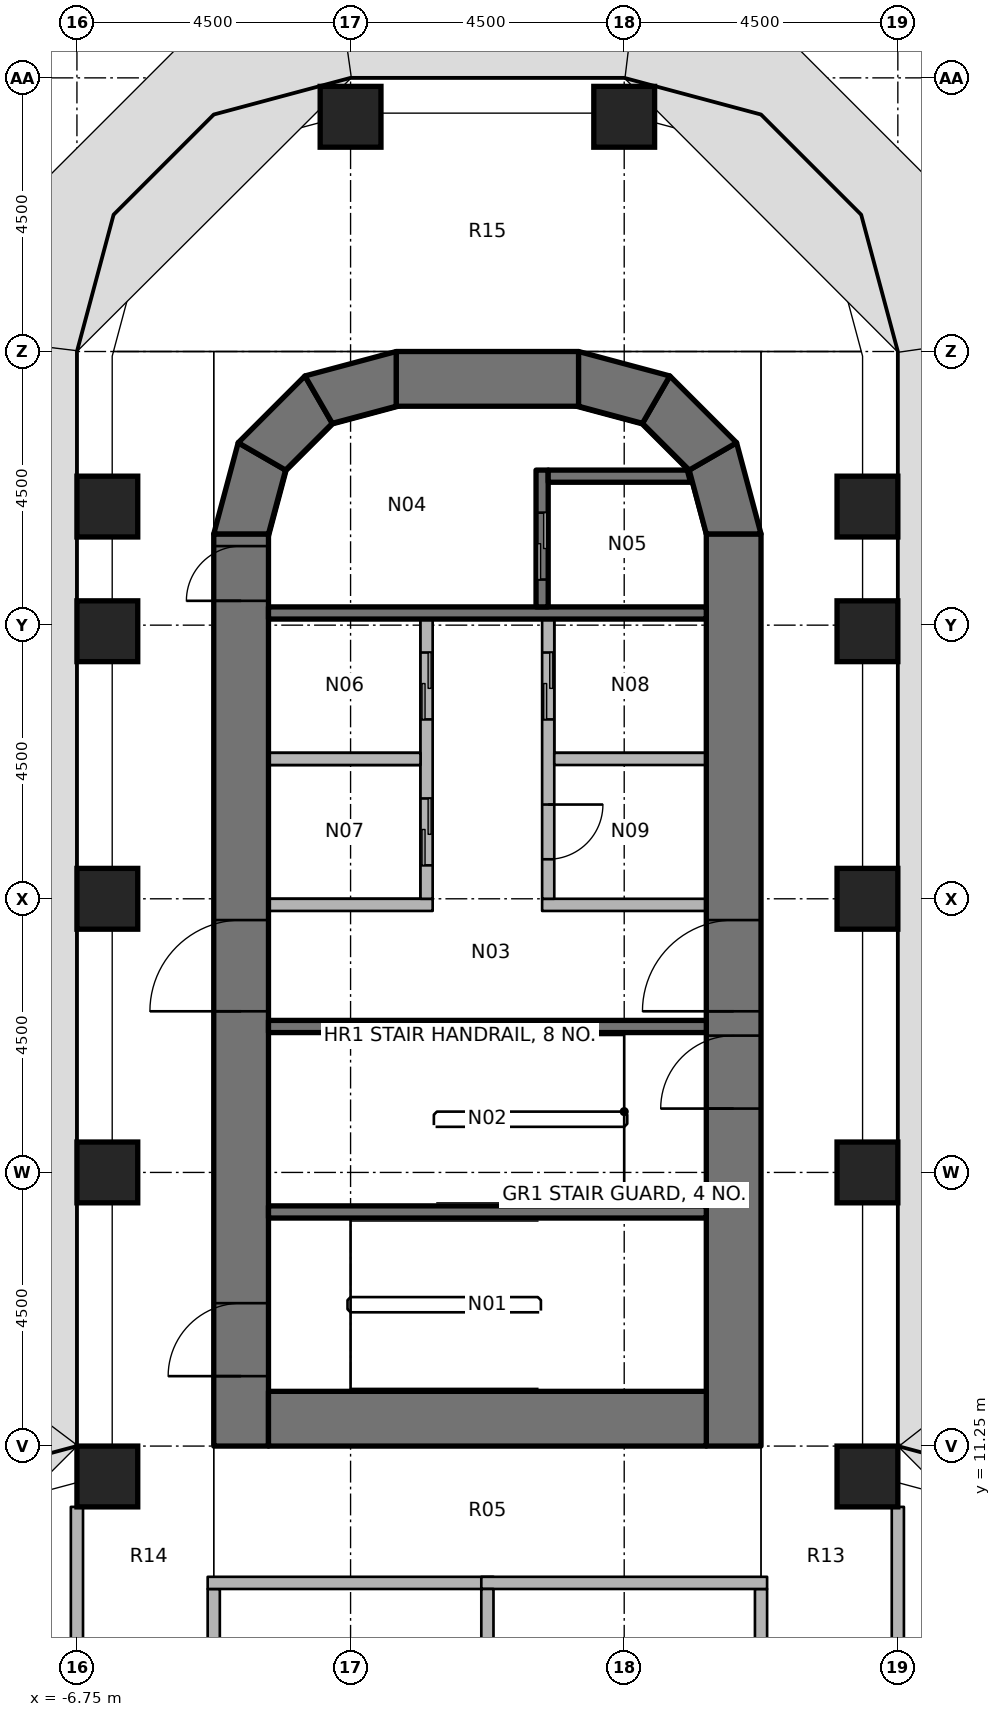
"""IFC4 building model, lengths in metres.
Left out: names, types, materials, properties, quantities, classifications, styles, units other than length and angle.
Written with IfcOpenShell. Run it as: python <this file> out.ifc"""

import sys

from ifc_helpers import new_model, si_unit, direction, frame, frame_2d, origin, origin_2d, place, context, subcontext, project, spatial, polyline, rectangle, outline, extrude, element, fill, save


model = new_model("IFC4")
c1 = context("Model", 3, precision=1e-05, world=origin(), true_north=direction((0.0, 1.0)))
c2 = subcontext(c1, "Body", "Model", "MODEL_VIEW")
j1 = project(units=[si_unit("LENGTHUNIT", "METRE"), si_unit("PLANEANGLEUNIT", "RADIAN")], contexts=[c1])
p1 = place(None, origin())
s1 = spatial("IfcSite", under=j1, at=p1, CompositionType="ELEMENT")
p2 = place(p1, origin())
s2 = spatial("IfcBuilding", under=s1, at=p2, CompositionType="ELEMENT")
p3 = place(p2, frame((0.0, 0.0, 56.4)))
s3 = spatial("IfcBuildingStorey", under=s2, at=p3, CompositionType="ELEMENT", Elevation=56.4)
for number, where, z_axis, x_axis in (
    (1, (-6.25, 10.75, 0.0), (0.0, 0.0, 1.0), (1.0, 0.0, 0.0)),
    (2, (-6.25, 15.75, 0.0), (0.0, 0.0, 1.0), (1.0, 0.0, 0.0)),
    (3, (-6.25, 20.25, 0.0), (0.0, 0.0, 1.0), (1.0, 0.0, 0.0)),
    (4, (-6.25, 24.65, 0.0), (0.0, 0.0, 1.0), (1.0, 0.0, 0.0)),
    (5, (-6.25, 26.7, 0.0), (0.0, 0.0, 1.0), (1.0, 0.0, 0.0)),
    (6, (-2.25, 33.11, 0.0), (0.0, 0.0, 1.0), (1.0, 0.0, 0.0)),
    (7, (2.25, 33.11, 0.0), (0.0, 0.0, 1.0), (1.0, 0.0, 0.0)),
    (8, (6.25, 10.75, 0.0), (0.0, 0.0, 1.0), (1.0, 0.0, 0.0)),
    (9, (6.25, 15.75, 0.0), (0.0, 0.0, 1.0), (1.0, 0.0, 0.0)),
    (10, (6.25, 20.25, 0.0), (0.0, 0.0, 1.0), (1.0, 0.0, 0.0)),
    (11, (6.25, 24.65, 0.0), (0.0, 0.0, 1.0), (1.0, 0.0, 0.0)),
    (12, (6.25, 26.7, 0.0), (0.0, 0.0, 1.0), (1.0, 0.0, 0.0)),
):
    element("IfcColumn", number, at=place(p3, frame(where, z_axis=z_axis, x_axis=x_axis)), inside=s3, PredefinedType="COLUMN", context=c2, shape_type="SweptSolid", body=[
        extrude(rectangle(XDim=1.0, YDim=1.0, at=origin_2d()), origin(), (0.0, 0.0, 1.0), 4.05),
    ])
p4 = place(p3, frame((-4.05, 11.25, 0.0), z_axis=(0.0, 0.0, 1.0), x_axis=(0.0, 1.0, 0.0)))
e13 = element("IfcWall", 13, at=p4, inside=s3, PredefinedType="SHEAR", context=c2, shape_type="SweptSolid", body=[
    extrude(rectangle(XDim=15.0, YDim=0.9, at=frame_2d((7.5, 0.0))), origin(), (0.0, 0.0, 1.0), 4.2),
])
p5 = place(p4, frame((7.15, 0.0, 0.0)))
e14 = element("IfcOpeningElement", 14, at=p5, cuts=e13, PredefinedType="OPENING", context=c2, shape_type="SweptSolid", body=[
    extrude(rectangle(XDim=1.5, YDim=2.3, at=frame_2d((0.75, 1.15))), frame((0.0, 0.46, 0.0), z_axis=(0.0, -1.0, 0.0), x_axis=(1.0, 0.0, 0.0)), (0.0, 0.0, 1.0), 0.92),
])
p6 = place(p4, frame((13.9, 0.0, 0.0)))
e15 = element("IfcOpeningElement", 15, at=p6, cuts=e13, PredefinedType="OPENING", context=c2, shape_type="SweptSolid", body=[
    extrude(rectangle(XDim=0.9, YDim=2.1, at=frame_2d((0.45, 1.05))), frame((0.0, 0.46, 0.0), z_axis=(0.0, -1.0, 0.0), x_axis=(1.0, 0.0, 0.0)), (0.0, 0.0, 1.0), 0.92),
])
p7 = place(p4, frame((1.15, 0.0, 0.0)))
e16 = element("IfcOpeningElement", 16, at=p7, cuts=e13, PredefinedType="OPENING", context=c2, shape_type="SweptSolid", body=[
    extrude(rectangle(XDim=1.2, YDim=2.1, at=frame_2d((0.6, 1.05))), frame((0.0, 0.46, 0.0), z_axis=(0.0, -1.0, 0.0), x_axis=(1.0, 0.0, 0.0)), (0.0, 0.0, 1.0), 0.92),
])
p8 = place(p3, frame((4.05, 11.25, 0.0), z_axis=(0.0, 0.0, 1.0), x_axis=(0.0, 1.0, 0.0)))
e17 = element("IfcWall", 17, at=p8, inside=s3, PredefinedType="SHEAR", context=c2, shape_type="SweptSolid", body=[
    extrude(rectangle(XDim=15.0, YDim=0.9, at=frame_2d((7.5, 0.0))), origin(), (0.0, 0.0, 1.0), 4.2),
])
p9 = place(p8, frame((7.15, 0.0, 0.0)))
e18 = element("IfcOpeningElement", 18, at=p9, cuts=e17, PredefinedType="OPENING", context=c2, shape_type="SweptSolid", body=[
    extrude(rectangle(XDim=1.5, YDim=2.3, at=frame_2d((0.75, 1.15))), frame((0.0, 0.46, 0.0), z_axis=(0.0, -1.0, 0.0), x_axis=(1.0, 0.0, 0.0)), (0.0, 0.0, 1.0), 0.92),
])
p10 = place(p8, frame((5.55, 0.0, 0.0)))
e19 = element("IfcOpeningElement", 19, at=p10, cuts=e17, PredefinedType="OPENING", context=c2, shape_type="SweptSolid", body=[
    extrude(rectangle(XDim=1.2, YDim=2.1, at=frame_2d((0.6, 1.05))), frame((0.0, 0.46, 0.0), z_axis=(0.0, -1.0, 0.0), x_axis=(1.0, 0.0, 0.0)), (0.0, 0.0, 1.0), 0.92),
])
p11 = place(p3, frame((-3.6, 11.7, 0.0), z_axis=(0.0, 0.0, 1.0), x_axis=(1.0, 0.0, 0.0)))
e20 = element("IfcWall", 20, at=p11, inside=s3, PredefinedType="SHEAR", context=c2, shape_type="SweptSolid", body=[
    extrude(rectangle(XDim=7.2, YDim=0.9, at=frame_2d((3.6, 0.0))), origin(), (0.0, 0.0, 1.0), 4.2),
])
p12 = place(p3, frame((-1.5, 28.8, 0.0), z_axis=(0.0, 0.0, 1.0), x_axis=(1.0, 0.0, 0.0)))
e21 = element("IfcWall", 21, at=p12, inside=s3, PredefinedType="SHEAR", context=c2, shape_type="SweptSolid", body=[
    extrude(rectangle(XDim=3.0, YDim=0.9, at=frame_2d((1.5, 0.0))), origin(), (0.0, 0.0, 1.0), 4.2),
])
p13 = place(p3, origin())
e22 = element("IfcWall", 22, at=p13, inside=s3, PredefinedType="SHEAR", context=c2, shape_type="SweptSolid", body=[
    extrude(outline(polyline([(-4.5, 26.25), (-4.098, 27.75), (-3.319, 27.3), (-3.6, 26.25), (-4.5, 26.25)])), origin(), (0.0, 0.0, 1.0), 4.2),
])
p14 = place(p3, origin())
e23 = element("IfcWall", 23, at=p14, inside=s3, PredefinedType="SHEAR", context=c2, shape_type="SweptSolid", body=[
    extrude(outline(polyline([(-4.098, 27.75), (-3.0, 28.848), (-2.55, 28.069), (-3.319, 27.3), (-4.098, 27.75)])), origin(), (0.0, 0.0, 1.0), 4.2),
])
p15 = place(p3, origin())
e24 = element("IfcWall", 24, at=p15, inside=s3, PredefinedType="SHEAR", context=c2, shape_type="SweptSolid", body=[
    extrude(outline(polyline([(-3.0, 28.848), (-1.5, 29.25), (-1.5, 28.35), (-2.55, 28.069), (-3.0, 28.848)])), origin(), (0.0, 0.0, 1.0), 4.2),
])
p16 = place(p3, origin())
e25 = element("IfcWall", 25, at=p16, inside=s3, PredefinedType="SHEAR", context=c2, shape_type="SweptSolid", body=[
    extrude(outline(polyline([(4.5, 26.25), (4.098, 27.75), (3.319, 27.3), (3.6, 26.25), (4.5, 26.25)])), origin(), (0.0, 0.0, 1.0), 4.2),
])
p17 = place(p3, origin())
e26 = element("IfcWall", 26, at=p17, inside=s3, PredefinedType="SHEAR", context=c2, shape_type="SweptSolid", body=[
    extrude(outline(polyline([(4.098, 27.75), (3.0, 28.848), (2.55, 28.069), (3.319, 27.3), (4.098, 27.75)])), origin(), (0.0, 0.0, 1.0), 4.2),
])
p18 = place(p3, origin())
e27 = element("IfcWall", 27, at=p18, inside=s3, PredefinedType="SHEAR", context=c2, shape_type="SweptSolid", body=[
    extrude(outline(polyline([(3.0, 28.848), (1.5, 29.25), (1.5, 28.35), (2.55, 28.069), (3.0, 28.848)])), origin(), (0.0, 0.0, 1.0), 4.2),
])
p19 = place(p3, frame((-3.6, 24.95, 0.0), z_axis=(0.0, 0.0, 1.0), x_axis=(1.0, 0.0, 0.0)))
e28 = element("IfcWall", 28, at=p19, inside=s3, PredefinedType="SHEAR", context=c2, shape_type="SweptSolid", body=[
    extrude(rectangle(XDim=7.2, YDim=0.2, at=frame_2d((3.6, 0.0))), origin(), (0.0, 0.0, 1.0), 4.05),
])
p20 = place(p3, frame((0.9, 27.3, 0.0), z_axis=(0.0, 0.0, 1.0), x_axis=(0.0, -1.0, 0.0)))
e29 = element("IfcWall", 29, at=p20, inside=s3, PredefinedType="SHEAR", context=c2, shape_type="SweptSolid", body=[
    extrude(rectangle(XDim=2.25, YDim=0.2, at=frame_2d((1.125, 0.0))), origin(), (0.0, 0.0, 1.0), 4.05),
])
p21 = place(p20, frame((0.7, 0.0, 0.0)))
e30 = element("IfcOpeningElement", 30, at=p21, cuts=e29, PredefinedType="OPENING", context=c2, shape_type="SweptSolid", body=[
    extrude(rectangle(XDim=1.1, YDim=2.3, at=frame_2d((0.55, 1.15))), frame((0.0, 0.11, 0.0), z_axis=(0.0, -1.0, 0.0), x_axis=(1.0, 0.0, 0.0)), (0.0, 0.0, 1.0), 0.22),
])
p22 = place(p3, origin())
e31 = element("IfcWall", 31, at=p22, inside=s3, PredefinedType="SHEAR", context=c2, shape_type="SweptSolid", body=[
    extrude(outline(polyline([(1.0, 27.1), (3.341, 27.1), (3.291, 27.284), (3.275, 27.3), (1.0, 27.3), (1.0, 27.1)])), origin(), (0.0, 0.0, 1.0), 4.05),
])
for number, where, z_axis, x_axis in (
    (32, (-3.6, 18.15, 0.0), (0.0, 0.0, 1.0), (1.0, 0.0, 0.0)),
    (33, (-3.6, 15.1, 0.0), (0.0, 0.0, 1.0), (1.0, 0.0, 0.0)),
):
    element("IfcWall", number, at=place(p3, frame(where, z_axis=z_axis, x_axis=x_axis)), inside=s3, PredefinedType="SHEAR", context=c2, shape_type="SweptSolid", body=[
        extrude(rectangle(XDim=7.2, YDim=0.2, at=frame_2d((3.6, 0.0))), origin(), (0.0, 0.0, 1.0), 4.05),
    ])
p23 = place(p3, frame((-3.6, 20.15, 0.0), z_axis=(0.0, 0.0, 1.0), x_axis=(1.0, 0.0, 0.0)))
e34 = element("IfcWall", 34, at=p23, inside=s3, PredefinedType="PARTITIONING", context=c2, shape_type="SweptSolid", body=[
    extrude(rectangle(XDim=2.7, YDim=0.2, at=frame_2d((1.35, 0.0))), origin(), (0.0, 0.0, 1.0), 4.05),
])
p24 = place(p3, frame((-1.0, 24.85, 0.0), z_axis=(0.0, 0.0, 1.0), x_axis=(0.0, -1.0, 0.0)))
e35 = element("IfcWall", 35, at=p24, inside=s3, PredefinedType="PARTITIONING", context=c2, shape_type="SweptSolid", body=[
    extrude(rectangle(XDim=4.6, YDim=0.2, at=frame_2d((2.3, 0.0))), origin(), (0.0, 0.0, 1.0), 4.05),
])
p25 = place(p24, frame((0.55, 0.0, 0.0)))
e36 = element("IfcOpeningElement", 36, at=p25, cuts=e35, PredefinedType="OPENING", context=c2, shape_type="SweptSolid", body=[
    extrude(rectangle(XDim=1.1, YDim=2.3, at=frame_2d((0.55, 1.15))), frame((0.0, 0.11, 0.0), z_axis=(0.0, -1.0, 0.0), x_axis=(1.0, 0.0, 0.0)), (0.0, 0.0, 1.0), 0.22),
])
p26 = place(p24, frame((2.95, 0.0, 0.0)))
e37 = element("IfcOpeningElement", 37, at=p26, cuts=e35, PredefinedType="OPENING", context=c2, shape_type="SweptSolid", body=[
    extrude(rectangle(XDim=1.1, YDim=2.3, at=frame_2d((0.55, 1.15))), frame((0.0, 0.11, 0.0), z_axis=(0.0, -1.0, 0.0), x_axis=(1.0, 0.0, 0.0)), (0.0, 0.0, 1.0), 0.22),
])
p27 = place(p3, frame((0.9, 20.15, 0.0), z_axis=(0.0, 0.0, 1.0), x_axis=(1.0, 0.0, 0.0)))
e38 = element("IfcWall", 38, at=p27, inside=s3, PredefinedType="PARTITIONING", context=c2, shape_type="SweptSolid", body=[
    extrude(rectangle(XDim=2.7, YDim=0.2, at=frame_2d((1.35, 0.0))), origin(), (0.0, 0.0, 1.0), 4.05),
])
p28 = place(p3, frame((1.0, 24.85, 0.0), z_axis=(0.0, 0.0, 1.0), x_axis=(0.0, -1.0, 0.0)))
e39 = element("IfcWall", 39, at=p28, inside=s3, PredefinedType="PARTITIONING", context=c2, shape_type="SweptSolid", body=[
    extrude(rectangle(XDim=4.6, YDim=0.2, at=frame_2d((2.3, 0.0))), origin(), (0.0, 0.0, 1.0), 4.05),
])
p29 = place(p28, frame((0.55, 0.0, 0.0)))
e40 = element("IfcOpeningElement", 40, at=p29, cuts=e39, PredefinedType="OPENING", context=c2, shape_type="SweptSolid", body=[
    extrude(rectangle(XDim=1.1, YDim=2.3, at=frame_2d((0.55, 1.15))), frame((0.0, 0.11, 0.0), z_axis=(0.0, -1.0, 0.0), x_axis=(1.0, 0.0, 0.0)), (0.0, 0.0, 1.0), 0.22),
])
p30 = place(p28, frame((3.05, 0.0, 0.0)))
e41 = element("IfcOpeningElement", 41, at=p30, cuts=e39, PredefinedType="OPENING", context=c2, shape_type="SweptSolid", body=[
    extrude(rectangle(XDim=0.9, YDim=2.1, at=frame_2d((0.45, 1.05))), frame((0.0, 0.11, 0.0), z_axis=(0.0, -1.0, 0.0), x_axis=(1.0, 0.0, 0.0)), (0.0, 0.0, 1.0), 0.22),
])
for number, where, z_axis, x_axis in (
    (42, (-3.6, 22.55, 0.0), (0.0, 0.0, 1.0), (1.0, 0.0, 0.0)),
    (43, (1.1, 22.55, 0.0), (0.0, 0.0, 1.0), (1.0, 0.0, 0.0)),
):
    element("IfcWall", number, at=place(p3, frame(where, z_axis=z_axis, x_axis=x_axis)), inside=s3, PredefinedType="PARTITIONING", context=c2, shape_type="SweptSolid", body=[
        extrude(rectangle(XDim=2.5, YDim=0.2, at=frame_2d((1.25, 0.0))), origin(), (0.0, 0.0, 1.0), 4.05),
    ])
p31 = place(p3, frame((-4.5, 8.9, 0.0), z_axis=(0.0, 0.0, 1.0), x_axis=(0.0, -1.0, 0.0)))
e44 = element("IfcWall", 44, at=p31, inside=s3, PredefinedType="PARTITIONING", context=c2, shape_type="SweptSolid", body=[
    extrude(rectangle(XDim=8.8, YDim=0.2, at=frame_2d((4.4, 0.0))), origin(), (0.0, 0.0, 1.0), 3.131),
])
p32 = place(p31, frame((3.9, 0.0, 0.0)))
e45 = element("IfcOpeningElement", 45, at=p32, cuts=e44, PredefinedType="OPENING", context=c2, shape_type="SweptSolid", body=[
    extrude(rectangle(XDim=1.0, YDim=2.1, at=frame_2d((0.5, 1.05))), frame((0.0, 0.11, 0.0), z_axis=(0.0, -1.0, 0.0), x_axis=(1.0, 0.0, 0.0)), (0.0, 0.0, 1.0), 0.22),
])
p33 = place(p3, frame((-6.75, 6.75, 0.0), z_axis=(0.0, 0.0, 1.0), x_axis=(0.0, 1.0, 0.0)))
e46 = element("IfcWall", 46, at=p33, inside=s3, PredefinedType="PARTITIONING", context=c2, shape_type="SweptSolid", body=[
    extrude(rectangle(XDim=3.5, YDim=0.2, at=frame_2d((1.75, 0.0))), origin(), (0.0, 0.0, 1.0), 3.131),
])
p34 = place(p3, frame((4.5, 0.1, 0.0), z_axis=(0.0, 0.0, 1.0), x_axis=(0.0, 1.0, 0.0)))
e47 = element("IfcWall", 47, at=p34, inside=s3, PredefinedType="PARTITIONING", context=c2, shape_type="SweptSolid", body=[
    extrude(rectangle(XDim=8.8, YDim=0.2, at=frame_2d((4.4, 0.0))), origin(), (0.0, 0.0, 1.0), 3.131),
])
p35 = place(p34, frame((3.9, 0.0, 0.0)))
e48 = element("IfcOpeningElement", 48, at=p35, cuts=e47, PredefinedType="OPENING", context=c2, shape_type="SweptSolid", body=[
    extrude(rectangle(XDim=1.0, YDim=2.1, at=frame_2d((0.5, 1.05))), frame((0.0, 0.11, 0.0), z_axis=(0.0, -1.0, 0.0), x_axis=(1.0, 0.0, 0.0)), (0.0, 0.0, 1.0), 0.22),
])
p36 = place(p3, frame((6.75, 6.75, 0.0), z_axis=(0.0, 0.0, 1.0), x_axis=(0.0, 1.0, 0.0)))
e49 = element("IfcWall", 49, at=p36, inside=s3, PredefinedType="PARTITIONING", context=c2, shape_type="SweptSolid", body=[
    extrude(rectangle(XDim=3.5, YDim=0.2, at=frame_2d((1.75, 0.0))), origin(), (0.0, 0.0, 1.0), 3.131),
])
for number, where, z_axis, x_axis in (
    (50, (-4.6, 9.0, 0.0), (0.0, 0.0, 1.0), (1.0, 0.0, 0.0)),
    (51, (-0.1, 9.0, 0.0), (0.0, 0.0, 1.0), (1.0, 0.0, 0.0)),
):
    element("IfcWall", number, at=place(p3, frame(where, z_axis=z_axis, x_axis=x_axis)), inside=s3, PredefinedType="PARTITIONING", context=c2, shape_type="SweptSolid", body=[
        extrude(rectangle(XDim=4.7, YDim=0.2, at=frame_2d((2.35, 0.0))), origin(), (0.0, 0.0, 1.0), 3.131),
    ])
p37 = place(p3, frame((0.0, 0.1, 0.0), z_axis=(0.0, 0.0, 1.0), x_axis=(0.0, 1.0, 0.0)))
e52 = element("IfcWall", 52, at=p37, inside=s3, PredefinedType="PARTITIONING", context=c2, shape_type="SweptSolid", body=[
    extrude(rectangle(XDim=8.8, YDim=0.2, at=frame_2d((4.4, 0.0))), origin(), (0.0, 0.0, 1.0), 3.131),
])
p38 = place(p5, origin())
e53 = element("IfcDoor", 53, at=p38, inside=s3, OperationType="DOUBLE_DOOR_SINGLE_SWING", PredefinedType="DOOR", context=c2, shape_type="SweptSolid", body=[
    extrude(rectangle(XDim=1.5, YDim=2.3, at=frame_2d((0.75, 1.15))), frame((0.0, 0.025, 0.0), z_axis=(0.0, -1.0, 0.0), x_axis=(1.0, 0.0, 0.0)), (0.0, 0.0, 1.0), 0.05),
])
fill(e14, e53)
p39 = place(p9, origin())
e54 = element("IfcDoor", 54, at=p39, inside=s3, OperationType="DOUBLE_DOOR_SINGLE_SWING", PredefinedType="DOOR", context=c2, shape_type="SweptSolid", body=[
    extrude(rectangle(XDim=1.5, YDim=2.3, at=frame_2d((0.75, 1.15))), frame((0.0, 0.025, 0.0), z_axis=(0.0, -1.0, 0.0), x_axis=(1.0, 0.0, 0.0)), (0.0, 0.0, 1.0), 0.05),
])
fill(e18, e54)
p40 = place(p6, origin())
e55 = element("IfcDoor", 55, at=p40, inside=s3, OperationType="SINGLE_SWING_RIGHT", PredefinedType="DOOR", context=c2, shape_type="SweptSolid", body=[
    extrude(rectangle(XDim=0.9, YDim=2.1, at=frame_2d((0.45, 1.05))), frame((0.0, 0.025, 0.0), z_axis=(0.0, -1.0, 0.0), x_axis=(1.0, 0.0, 0.0)), (0.0, 0.0, 1.0), 0.05),
])
fill(e15, e55)
p41 = place(p10, origin())
e56 = element("IfcDoor", 56, at=p41, inside=s3, OperationType="SINGLE_SWING_LEFT", PredefinedType="DOOR", context=c2, shape_type="SweptSolid", body=[
    extrude(rectangle(XDim=1.2, YDim=2.1, at=frame_2d((0.6, 1.05))), frame((0.0, 0.025, 0.0), z_axis=(0.0, -1.0, 0.0), x_axis=(1.0, 0.0, 0.0)), (0.0, 0.0, 1.0), 0.05),
])
fill(e19, e56)
p42 = place(p7, origin())
e57 = element("IfcDoor", 57, at=p42, inside=s3, OperationType="SINGLE_SWING_LEFT", PredefinedType="DOOR", context=c2, shape_type="SweptSolid", body=[
    extrude(rectangle(XDim=1.2, YDim=2.1, at=frame_2d((0.6, 1.05))), frame((0.0, 0.025, 0.0), z_axis=(0.0, -1.0, 0.0), x_axis=(1.0, 0.0, 0.0)), (0.0, 0.0, 1.0), 0.05),
])
fill(e16, e57)
p43 = place(p21, origin())
e58 = element("IfcDoor", 58, at=p43, inside=s3, OperationType="DOUBLE_DOOR_SLIDING", PredefinedType="DOOR", context=c2, shape_type="SweptSolid", body=[
    extrude(rectangle(XDim=1.1, YDim=2.3, at=frame_2d((0.55, 1.15))), frame((0.0, 0.025, 0.0), z_axis=(0.0, -1.0, 0.0), x_axis=(1.0, 0.0, 0.0)), (0.0, 0.0, 1.0), 0.05),
])
fill(e30, e58)
p44 = place(p25, origin())
e59 = element("IfcDoor", 59, at=p44, inside=s3, OperationType="DOUBLE_DOOR_SLIDING", PredefinedType="DOOR", context=c2, shape_type="SweptSolid", body=[
    extrude(rectangle(XDim=1.1, YDim=2.3, at=frame_2d((0.55, 1.15))), frame((0.0, 0.025, 0.0), z_axis=(0.0, -1.0, 0.0), x_axis=(1.0, 0.0, 0.0)), (0.0, 0.0, 1.0), 0.05),
])
fill(e36, e59)
p45 = place(p26, origin())
e60 = element("IfcDoor", 60, at=p45, inside=s3, OperationType="DOUBLE_DOOR_SLIDING", PredefinedType="DOOR", context=c2, shape_type="SweptSolid", body=[
    extrude(rectangle(XDim=1.1, YDim=2.3, at=frame_2d((0.55, 1.15))), frame((0.0, 0.025, 0.0), z_axis=(0.0, -1.0, 0.0), x_axis=(1.0, 0.0, 0.0)), (0.0, 0.0, 1.0), 0.05),
])
fill(e37, e60)
p46 = place(p29, origin())
e61 = element("IfcDoor", 61, at=p46, inside=s3, OperationType="DOUBLE_DOOR_SLIDING", PredefinedType="DOOR", context=c2, shape_type="SweptSolid", body=[
    extrude(rectangle(XDim=1.1, YDim=2.3, at=frame_2d((0.55, 1.15))), frame((0.0, 0.025, 0.0), z_axis=(0.0, -1.0, 0.0), x_axis=(1.0, 0.0, 0.0)), (0.0, 0.0, 1.0), 0.05),
])
fill(e40, e61)
p47 = place(p30, origin())
e62 = element("IfcDoor", 62, at=p47, inside=s3, OperationType="SINGLE_SWING_RIGHT", PredefinedType="DOOR", context=c2, shape_type="SweptSolid", body=[
    extrude(rectangle(XDim=0.9, YDim=2.1, at=frame_2d((0.45, 1.05))), frame((0.0, 0.025, 0.0), z_axis=(0.0, -1.0, 0.0), x_axis=(1.0, 0.0, 0.0)), (0.0, 0.0, 1.0), 0.05),
])
fill(e41, e62)
save(model, sys.argv[1])
